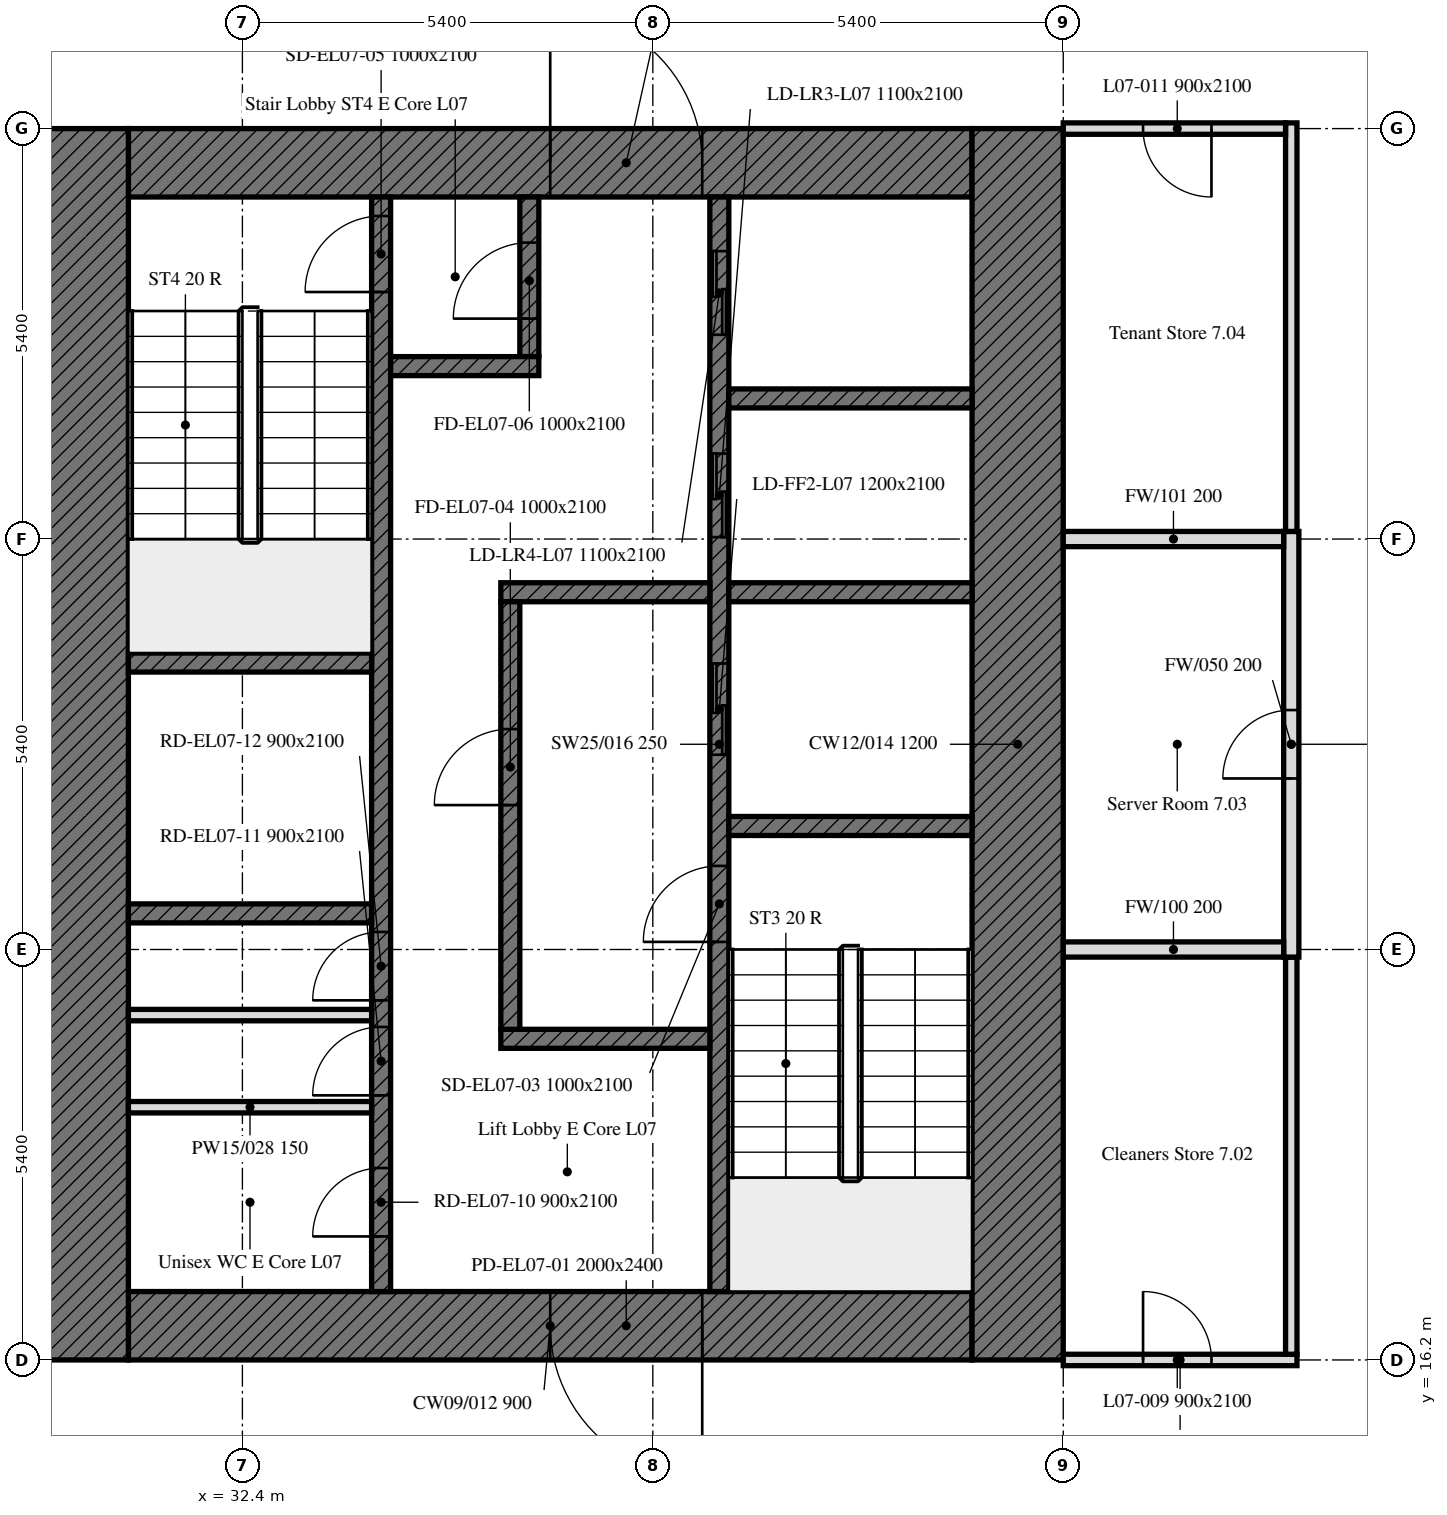
"""IFC4 building model, lengths in metres.
Left out: names, types, materials, properties, quantities, classifications, styles, units other than length and angle.
Written with IfcOpenShell. Run it as: python <this file> out.ifc"""

import sys

from ifc_helpers import new_model, si_unit, direction, frame, frame_2d, origin, place, context, subcontext, project, spatial, rectangle, extrude, element, fill, save


model = new_model("IFC4")
c1 = context("Model", 3, precision=1e-05, world=origin(), true_north=direction((0.0, 1.0)))
c2 = subcontext(c1, "Body", "Model", "MODEL_VIEW")
j1 = project(units=[si_unit("LENGTHUNIT", "METRE"), si_unit("PLANEANGLEUNIT", "RADIAN")], contexts=[c1])
p1 = place(None, origin())
s1 = spatial("IfcSite", under=j1, at=p1, CompositionType="ELEMENT")
p2 = place(p1, origin())
s2 = spatial("IfcBuilding", under=s1, at=p2, CompositionType="ELEMENT")
p3 = place(p2, frame((0.0, 0.0, 37.4)))
s3 = spatial("IfcBuildingStorey", under=s2, at=p3, CompositionType="ELEMENT", Elevation=37.4)
p4 = place(p3, frame((42.0, 16.65, 0.0), z_axis=(0.0, 0.0, 1.0), x_axis=(-1.0, 0.0, 0.0)))
e1 = element("IfcWall", 1, at=p4, inside=s3, PredefinedType="SOLIDWALL", context=c2, shape_type="SweptSolid", body=[
    extrude(rectangle(XDim=11.1, YDim=0.9, at=frame_2d((5.55, 0.0))), origin(), (0.0, 0.0, 1.0), 3.5),
])
p5 = place(p4, frame((3.55, 0.0, 0.0)))
e2 = element("IfcOpeningElement", 2, at=p5, cuts=e1, PredefinedType="OPENING", context=c2, shape_type="SweptSolid", body=[
    extrude(rectangle(XDim=2.0, YDim=2.4, at=frame_2d((1.0, 1.2))), frame((0.0, 0.45, 0.0), z_axis=(0.0, -1.0, 0.0), x_axis=(1.0, 0.0, 0.0)), (0.0, 0.0, 1.0), 0.9),
])
p6 = place(p3, frame((30.9, 31.95, 0.0), z_axis=(0.0, 0.0, 1.0), x_axis=(1.0, 0.0, 0.0)))
e3 = element("IfcWall", 3, at=p6, inside=s3, PredefinedType="SOLIDWALL", context=c2, shape_type="SweptSolid", body=[
    extrude(rectangle(XDim=11.1, YDim=0.9, at=frame_2d((5.55, 0.0))), origin(), (0.0, 0.0, 1.0), 3.5),
])
p7 = place(p6, frame((5.55, 0.0, 0.0)))
e4 = element("IfcOpeningElement", 4, at=p7, cuts=e3, PredefinedType="OPENING", context=c2, shape_type="SweptSolid", body=[
    extrude(rectangle(XDim=2.0, YDim=2.4, at=frame_2d((1.0, 1.2))), frame((0.0, 0.45, 0.0), z_axis=(0.0, -1.0, 0.0), x_axis=(1.0, 0.0, 0.0)), (0.0, 0.0, 1.0), 0.9),
])
for number, where, z_axis, x_axis in (
    (5, (42.6, 32.4, 0.0), (0.0, 0.0, 1.0), (0.0, -1.0, 0.0)),
    (6, (30.3, 16.2, 0.0), (0.0, 0.0, 1.0), (0.0, 1.0, 0.0)),
):
    element("IfcWall", number, at=place(p3, frame(where, z_axis=z_axis, x_axis=x_axis)), inside=s3, PredefinedType="SOLIDWALL", context=c2, shape_type="SweptSolid", body=[
        extrude(rectangle(XDim=16.2, YDim=1.2, at=frame_2d((8.1, 0.0))), origin(), (0.0, 0.0, 1.0), 3.5),
    ])
p8 = place(p3, frame((38.675, 17.1, 0.0), z_axis=(0.0, 0.0, 1.0), x_axis=(0.0, 1.0, 0.0)))
e7 = element("IfcWall", 7, at=p8, inside=s3, PredefinedType="SOLIDWALL", context=c2, shape_type="SweptSolid", body=[
    extrude(rectangle(XDim=14.4, YDim=0.25, at=frame_2d((7.2, 0.0))), origin(), (0.0, 0.0, 1.0), 3.5),
])
p9 = place(p8, frame((4.6, 0.0, 0.0)))
e8 = element("IfcOpeningElement", 8, at=p9, cuts=e7, PredefinedType="OPENING", context=c2, shape_type="SweptSolid", body=[
    extrude(rectangle(XDim=1.0, YDim=2.1, at=frame_2d((0.5, 1.05))), frame((0.0, 0.125, 0.0), z_axis=(0.0, -1.0, 0.0), x_axis=(1.0, 0.0, 0.0)), (0.0, 0.0, 1.0), 0.25),
])
p10 = place(p8, frame((7.062, 0.0, 0.0)))
e9 = element("IfcOpeningElement", 9, at=p10, cuts=e7, PredefinedType="OPENING", context=c2, shape_type="SweptSolid", body=[
    extrude(rectangle(XDim=1.2, YDim=2.1, at=frame_2d((0.6, 1.05))), frame((0.0, 0.125, 0.0), z_axis=(0.0, -1.0, 0.0), x_axis=(1.0, 0.0, 0.0)), (0.0, 0.0, 1.0), 0.25),
])
p11 = place(p8, frame((9.925, 0.0, 0.0)))
e10 = element("IfcOpeningElement", 10, at=p11, cuts=e7, PredefinedType="OPENING", context=c2, shape_type="SweptSolid", body=[
    extrude(rectangle(XDim=1.1, YDim=2.1, at=frame_2d((0.55, 1.05))), frame((0.0, 0.125, 0.0), z_axis=(0.0, -1.0, 0.0), x_axis=(1.0, 0.0, 0.0)), (0.0, 0.0, 1.0), 0.25),
])
p12 = place(p8, frame((12.587, 0.0, 0.0)))
e11 = element("IfcOpeningElement", 11, at=p12, cuts=e7, PredefinedType="OPENING", context=c2, shape_type="SweptSolid", body=[
    extrude(rectangle(XDim=1.1, YDim=2.1, at=frame_2d((0.55, 1.05))), frame((0.0, 0.125, 0.0), z_axis=(0.0, -1.0, 0.0), x_axis=(1.0, 0.0, 0.0)), (0.0, 0.0, 1.0), 0.25),
])
p13 = place(p3, frame((34.225, 17.1, 0.0), z_axis=(0.0, 0.0, 1.0), x_axis=(0.0, 1.0, 0.0)))
e12 = element("IfcWall", 12, at=p13, inside=s3, PredefinedType="SOLIDWALL", context=c2, shape_type="SweptSolid", body=[
    extrude(rectangle(XDim=14.4, YDim=0.25, at=frame_2d((7.2, 0.0))), origin(), (0.0, 0.0, 1.0), 3.5),
])
p14 = place(p13, frame((13.15, 0.0, 0.0)))
e13 = element("IfcOpeningElement", 13, at=p14, cuts=e12, PredefinedType="OPENING", context=c2, shape_type="SweptSolid", body=[
    extrude(rectangle(XDim=1.0, YDim=2.1, at=frame_2d((0.5, 1.05))), frame((0.0, 0.125, 0.0), z_axis=(0.0, -1.0, 0.0), x_axis=(1.0, 0.0, 0.0)), (0.0, 0.0, 1.0), 0.25),
])
p15 = place(p13, frame((0.725, 0.0, 0.0)))
e14 = element("IfcOpeningElement", 14, at=p15, cuts=e12, PredefinedType="OPENING", context=c2, shape_type="SweptSolid", body=[
    extrude(rectangle(XDim=0.9, YDim=2.1, at=frame_2d((0.45, 1.05))), frame((0.0, 0.125, 0.0), z_axis=(0.0, -1.0, 0.0), x_axis=(1.0, 0.0, 0.0)), (0.0, 0.0, 1.0), 0.25),
])
p16 = place(p13, frame((2.581, 0.0, 0.0)))
e15 = element("IfcOpeningElement", 15, at=p16, cuts=e12, PredefinedType="OPENING", context=c2, shape_type="SweptSolid", body=[
    extrude(rectangle(XDim=0.9, YDim=2.1, at=frame_2d((0.45, 1.05))), frame((0.0, 0.125, 0.0), z_axis=(0.0, -1.0, 0.0), x_axis=(1.0, 0.0, 0.0)), (0.0, 0.0, 1.0), 0.25),
])
p17 = place(p13, frame((3.831, 0.0, 0.0)))
e16 = element("IfcOpeningElement", 16, at=p17, cuts=e12, PredefinedType="OPENING", context=c2, shape_type="SweptSolid", body=[
    extrude(rectangle(XDim=0.9, YDim=2.1, at=frame_2d((0.45, 1.05))), frame((0.0, 0.125, 0.0), z_axis=(0.0, -1.0, 0.0), x_axis=(1.0, 0.0, 0.0)), (0.0, 0.0, 1.0), 0.25),
])
p18 = place(p3, frame((38.8, 23.225, 0.0), z_axis=(0.0, 0.0, 1.0), x_axis=(1.0, 0.0, 0.0)))
e17 = element("IfcWall", 17, at=p18, inside=s3, PredefinedType="SOLIDWALL", context=c2, shape_type="SweptSolid", body=[
    extrude(rectangle(XDim=3.2, YDim=0.25, at=frame_2d((1.6, 0.0))), origin(), (0.0, 0.0, 1.0), 3.5),
])
for number, where, z_axis, x_axis in (
    (18, (30.9, 25.375, 0.0), (0.0, 0.0, 1.0), (1.0, 0.0, 0.0)),
    (19, (30.9, 22.075, 0.0), (0.0, 0.0, 1.0), (1.0, 0.0, 0.0)),
):
    element("IfcWall", number, at=place(p3, frame(where, z_axis=z_axis, x_axis=x_axis)), inside=s3, PredefinedType="SOLIDWALL", context=c2, shape_type="SweptSolid", body=[
        extrude(rectangle(XDim=3.2, YDim=0.25, at=frame_2d((1.6, 0.0))), origin(), (0.0, 0.0, 1.0), 3.5),
    ])
p19 = place(p3, frame((38.8, 26.3, 0.0), z_axis=(0.0, 0.0, 1.0), x_axis=(1.0, 0.0, 0.0)))
e20 = element("IfcWall", 20, at=p19, inside=s3, PredefinedType="SOLIDWALL", context=c2, shape_type="SweptSolid", body=[
    extrude(rectangle(XDim=3.2, YDim=0.25, at=frame_2d((1.6, 0.0))), origin(), (0.0, 0.0, 1.0), 3.5),
])
for number, where, z_axis, x_axis in (
    (21, (35.8, 26.3, 0.0), (0.0, 0.0, 1.0), (1.0, 0.0, 0.0)),
    (22, (35.8, 20.425, 0.0), (0.0, 0.0, 1.0), (1.0, 0.0, 0.0)),
):
    element("IfcWall", number, at=place(p3, frame(where, z_axis=z_axis, x_axis=x_axis)), inside=s3, PredefinedType="SOLIDWALL", context=c2, shape_type="SweptSolid", body=[
        extrude(rectangle(XDim=2.75, YDim=0.25, at=frame_2d((1.375, 0.0))), origin(), (0.0, 0.0, 1.0), 3.5),
    ])
p20 = place(p3, frame((36.175, 29.4, 0.0), z_axis=(0.0, 0.0, 1.0), x_axis=(0.0, 1.0, 0.0)))
e23 = element("IfcWall", 23, at=p20, inside=s3, PredefinedType="SOLIDWALL", context=c2, shape_type="SweptSolid", body=[
    extrude(rectangle(XDim=2.1, YDim=0.25, at=frame_2d((1.05, 0.0))), origin(), (0.0, 0.0, 1.0), 3.5),
])
p21 = place(p20, frame((0.5, 0.0, 0.0)))
e24 = element("IfcOpeningElement", 24, at=p21, cuts=e23, PredefinedType="OPENING", context=c2, shape_type="SweptSolid", body=[
    extrude(rectangle(XDim=1.0, YDim=2.1, at=frame_2d((0.5, 1.05))), frame((0.0, 0.125, 0.0), z_axis=(0.0, -1.0, 0.0), x_axis=(1.0, 0.0, 0.0)), (0.0, 0.0, 1.0), 0.25),
])
p22 = place(p3, frame((34.35, 29.275, 0.0), z_axis=(0.0, 0.0, 1.0), x_axis=(1.0, 0.0, 0.0)))
e25 = element("IfcWall", 25, at=p22, inside=s3, PredefinedType="SOLIDWALL", context=c2, shape_type="SweptSolid", body=[
    extrude(rectangle(XDim=1.95, YDim=0.25, at=frame_2d((0.975, 0.0))), origin(), (0.0, 0.0, 1.0), 3.5),
])
p23 = place(p3, frame((35.925, 20.55, 0.0), z_axis=(0.0, 0.0, 1.0), x_axis=(0.0, 1.0, 0.0)))
e26 = element("IfcWall", 26, at=p23, inside=s3, PredefinedType="SOLIDWALL", context=c2, shape_type="SweptSolid", body=[
    extrude(rectangle(XDim=5.625, YDim=0.25, at=frame_2d((2.812, 0.0))), origin(), (0.0, 0.0, 1.0), 3.5),
])
p24 = place(p23, frame((2.95, 0.0, 0.0)))
e27 = element("IfcOpeningElement", 27, at=p24, cuts=e26, PredefinedType="OPENING", context=c2, shape_type="SweptSolid", body=[
    extrude(rectangle(XDim=1.0, YDim=2.1, at=frame_2d((0.5, 1.05))), frame((0.0, 0.125, 0.0), z_axis=(0.0, -1.0, 0.0), x_axis=(1.0, 0.0, 0.0)), (0.0, 0.0, 1.0), 0.25),
])
p25 = place(p3, frame((38.8, 28.85, 0.0), z_axis=(0.0, 0.0, 1.0), x_axis=(1.0, 0.0, 0.0)))
e28 = element("IfcWall", 28, at=p25, inside=s3, PredefinedType="SOLIDWALL", context=c2, shape_type="SweptSolid", body=[
    extrude(rectangle(XDim=3.2, YDim=0.25, at=frame_2d((1.6, 0.0))), origin(), (0.0, 0.0, 1.0), 3.5),
])
for number, where, z_axis, x_axis in (
    (29, (30.9, 19.525, 0.0), (0.0, 0.0, 1.0), (1.0, 0.0, 0.0)),
    (30, (30.9, 20.737, 0.0), (0.0, 0.0, 1.0), (1.0, 0.0, 0.0)),
):
    element("IfcWall", number, at=place(p3, frame(where, z_axis=z_axis, x_axis=x_axis)), inside=s3, PredefinedType="PARTITIONING", context=c2, shape_type="SweptSolid", body=[
        extrude(rectangle(XDim=3.2, YDim=0.15, at=frame_2d((1.6, 0.0))), origin(), (0.0, 0.0, 1.0), 3.5),
    ])
p26 = place(p3, frame((43.2, 16.2, 0.0), z_axis=(0.0, 0.0, 1.0), x_axis=(1.0, 0.0, 0.0)))
e31 = element("IfcWall", 31, at=p26, inside=s3, PredefinedType="PARTITIONING", context=c2, shape_type="SweptSolid", body=[
    extrude(rectangle(XDim=3.075, YDim=0.15, at=frame_2d((1.538, 0.0))), origin(), (0.0, 0.0, 1.0), 2.75),
])
p27 = place(p26, frame((1.05, 0.0, 0.0)))
e32 = element("IfcOpeningElement", 32, at=p27, cuts=e31, PredefinedType="OPENING", context=c2, shape_type="SweptSolid", body=[
    extrude(rectangle(XDim=0.9, YDim=2.1, at=frame_2d((0.45, 1.05))), frame((0.0, 0.075, 0.0), z_axis=(0.0, -1.0, 0.0), x_axis=(1.0, 0.0, 0.0)), (0.0, 0.0, 1.0), 0.15),
])
p28 = place(p3, frame((46.2, 16.275, 0.0), z_axis=(0.0, 0.0, 1.0), x_axis=(0.0, 1.0, 0.0)))
e33 = element("IfcWall", 33, at=p28, inside=s3, PredefinedType="PARTITIONING", context=c2, shape_type="SweptSolid", body=[
    extrude(rectangle(XDim=5.225, YDim=0.15, at=frame_2d((2.613, 0.0))), origin(), (0.0, 0.0, 1.0), 3.5),
])
p29 = place(p3, frame((46.2, 21.5, 0.0), z_axis=(0.0, 0.0, 1.0), x_axis=(0.0, 1.0, 0.0)))
e34 = element("IfcWall", 34, at=p29, inside=s3, PredefinedType="PARTITIONING", context=c2, shape_type="SweptSolid", body=[
    extrude(rectangle(XDim=5.6, YDim=0.2, at=frame_2d((2.8, 0.0))), origin(), (0.0, 0.0, 1.0), 3.5),
])
p30 = place(p29, frame((2.35, 0.0, 0.0)))
e35 = element("IfcOpeningElement", 35, at=p30, cuts=e34, PredefinedType="OPENING", context=c2, shape_type="SweptSolid", body=[
    extrude(rectangle(XDim=0.9, YDim=2.1, at=frame_2d((0.45, 1.05))), frame((0.0, 0.1, 0.0), z_axis=(0.0, -1.0, 0.0), x_axis=(1.0, 0.0, 0.0)), (0.0, 0.0, 1.0), 0.2),
])
p31 = place(p3, frame((46.2, 27.1, 0.0), z_axis=(0.0, 0.0, 1.0), x_axis=(0.0, 1.0, 0.0)))
e36 = element("IfcWall", 36, at=p31, inside=s3, PredefinedType="PARTITIONING", context=c2, shape_type="SweptSolid", body=[
    extrude(rectangle(XDim=5.375, YDim=0.15, at=frame_2d((2.688, 0.0))), origin(), (0.0, 0.0, 1.0), 3.5),
])
p32 = place(p3, frame((46.125, 32.4, 0.0), z_axis=(0.0, 0.0, 1.0), x_axis=(-1.0, 0.0, 0.0)))
e37 = element("IfcWall", 37, at=p32, inside=s3, PredefinedType="PARTITIONING", context=c2, shape_type="SweptSolid", body=[
    extrude(rectangle(XDim=2.925, YDim=0.15, at=frame_2d((1.462, 0.0))), origin(), (0.0, 0.0, 1.0), 2.75),
])
p33 = place(p32, frame((0.975, 0.0, 0.0)))
e38 = element("IfcOpeningElement", 38, at=p33, cuts=e37, PredefinedType="OPENING", context=c2, shape_type="SweptSolid", body=[
    extrude(rectangle(XDim=0.9, YDim=2.1, at=frame_2d((0.45, 1.05))), frame((0.0, 0.075, 0.0), z_axis=(0.0, -1.0, 0.0), x_axis=(1.0, 0.0, 0.0)), (0.0, 0.0, 1.0), 0.15),
])
for number, where, z_axis, x_axis in (
    (39, (46.1, 21.6, 0.0), (0.0, 0.0, 1.0), (-1.0, 0.0, 0.0)),
    (40, (46.1, 27.0, 0.0), (0.0, 0.0, 1.0), (-1.0, 0.0, 0.0)),
):
    element("IfcWall", number, at=place(p3, frame(where, z_axis=z_axis, x_axis=x_axis)), inside=s3, PredefinedType="PARTITIONING", context=c2, shape_type="SweptSolid", body=[
        extrude(rectangle(XDim=2.9, YDim=0.2, at=frame_2d((1.45, 0.0))), origin(), (0.0, 0.0, 1.0), 2.75),
    ])
p34 = place(p5, origin())
e41 = element("IfcDoor", 41, at=p34, inside=s3, OperationType="DOUBLE_DOOR_SINGLE_SWING", PredefinedType="DOOR", context=c2, shape_type="SweptSolid", body=[
    extrude(rectangle(XDim=2.0, YDim=2.4, at=frame_2d((1.0, 1.2))), frame((0.0, 0.025, 0.0), z_axis=(0.0, -1.0, 0.0), x_axis=(1.0, 0.0, 0.0)), (0.0, 0.0, 1.0), 0.05),
])
fill(e2, e41)
p35 = place(p7, origin())
e42 = element("IfcDoor", 42, at=p35, inside=s3, OperationType="DOUBLE_DOOR_SINGLE_SWING", PredefinedType="DOOR", context=c2, shape_type="SweptSolid", body=[
    extrude(rectangle(XDim=2.0, YDim=2.4, at=frame_2d((1.0, 1.2))), frame((0.0, 0.025, 0.0), z_axis=(0.0, -1.0, 0.0), x_axis=(1.0, 0.0, 0.0)), (0.0, 0.0, 1.0), 0.05),
])
fill(e4, e42)
p36 = place(p9, origin())
e43 = element("IfcDoor", 43, at=p36, inside=s3, OperationType="SINGLE_SWING_LEFT", PredefinedType="DOOR", context=c2, shape_type="SweptSolid", body=[
    extrude(rectangle(XDim=1.0, YDim=2.1, at=frame_2d((0.5, 1.05))), frame((0.0, 0.025, 0.0), z_axis=(0.0, -1.0, 0.0), x_axis=(1.0, 0.0, 0.0)), (0.0, 0.0, 1.0), 0.05),
])
fill(e8, e43)
p37 = place(p24, origin())
e44 = element("IfcDoor", 44, at=p37, inside=s3, OperationType="SINGLE_SWING_LEFT", PredefinedType="DOOR", context=c2, shape_type="SweptSolid", body=[
    extrude(rectangle(XDim=1.0, YDim=2.1, at=frame_2d((0.5, 1.05))), frame((0.0, 0.025, 0.0), z_axis=(0.0, -1.0, 0.0), x_axis=(1.0, 0.0, 0.0)), (0.0, 0.0, 1.0), 0.05),
])
fill(e27, e44)
p38 = place(p14, origin())
e45 = element("IfcDoor", 45, at=p38, inside=s3, OperationType="SINGLE_SWING_LEFT", PredefinedType="DOOR", context=c2, shape_type="SweptSolid", body=[
    extrude(rectangle(XDim=1.0, YDim=2.1, at=frame_2d((0.5, 1.05))), frame((0.0, 0.025, 0.0), z_axis=(0.0, -1.0, 0.0), x_axis=(1.0, 0.0, 0.0)), (0.0, 0.0, 1.0), 0.05),
])
fill(e13, e45)
p39 = place(p21, origin())
e46 = element("IfcDoor", 46, at=p39, inside=s3, OperationType="SINGLE_SWING_LEFT", PredefinedType="DOOR", context=c2, shape_type="SweptSolid", body=[
    extrude(rectangle(XDim=1.0, YDim=2.1, at=frame_2d((0.5, 1.05))), frame((0.0, 0.025, 0.0), z_axis=(0.0, -1.0, 0.0), x_axis=(1.0, 0.0, 0.0)), (0.0, 0.0, 1.0), 0.05),
])
fill(e24, e46)
p40 = place(p10, origin())
e47 = element("IfcDoor", 47, at=p40, inside=s3, OperationType="DOUBLE_DOOR_SLIDING", PredefinedType="DOOR", context=c2, shape_type="SweptSolid", body=[
    extrude(rectangle(XDim=1.2, YDim=2.1, at=frame_2d((0.6, 1.05))), frame((0.0, 0.025, 0.0), z_axis=(0.0, -1.0, 0.0), x_axis=(1.0, 0.0, 0.0)), (0.0, 0.0, 1.0), 0.05),
])
fill(e9, e47)
p41 = place(p11, origin())
e48 = element("IfcDoor", 48, at=p41, inside=s3, OperationType="DOUBLE_DOOR_SLIDING", PredefinedType="DOOR", context=c2, shape_type="SweptSolid", body=[
    extrude(rectangle(XDim=1.1, YDim=2.1, at=frame_2d((0.55, 1.05))), frame((0.0, 0.025, 0.0), z_axis=(0.0, -1.0, 0.0), x_axis=(1.0, 0.0, 0.0)), (0.0, 0.0, 1.0), 0.05),
])
fill(e10, e48)
p42 = place(p12, origin())
e49 = element("IfcDoor", 49, at=p42, inside=s3, OperationType="DOUBLE_DOOR_SLIDING", PredefinedType="DOOR", context=c2, shape_type="SweptSolid", body=[
    extrude(rectangle(XDim=1.1, YDim=2.1, at=frame_2d((0.55, 1.05))), frame((0.0, 0.025, 0.0), z_axis=(0.0, -1.0, 0.0), x_axis=(1.0, 0.0, 0.0)), (0.0, 0.0, 1.0), 0.05),
])
fill(e11, e49)
p43 = place(p15, origin())
e50 = element("IfcDoor", 50, at=p43, inside=s3, OperationType="SINGLE_SWING_LEFT", PredefinedType="DOOR", context=c2, shape_type="SweptSolid", body=[
    extrude(rectangle(XDim=0.9, YDim=2.1, at=frame_2d((0.45, 1.05))), frame((0.0, 0.025, 0.0), z_axis=(0.0, -1.0, 0.0), x_axis=(1.0, 0.0, 0.0)), (0.0, 0.0, 1.0), 0.05),
])
fill(e14, e50)
p44 = place(p16, origin())
e51 = element("IfcDoor", 51, at=p44, inside=s3, OperationType="SINGLE_SWING_LEFT", PredefinedType="DOOR", context=c2, shape_type="SweptSolid", body=[
    extrude(rectangle(XDim=0.9, YDim=2.1, at=frame_2d((0.45, 1.05))), frame((0.0, 0.025, 0.0), z_axis=(0.0, -1.0, 0.0), x_axis=(1.0, 0.0, 0.0)), (0.0, 0.0, 1.0), 0.05),
])
fill(e15, e51)
p45 = place(p17, origin())
e52 = element("IfcDoor", 52, at=p45, inside=s3, OperationType="SINGLE_SWING_LEFT", PredefinedType="DOOR", context=c2, shape_type="SweptSolid", body=[
    extrude(rectangle(XDim=0.9, YDim=2.1, at=frame_2d((0.45, 1.05))), frame((0.0, 0.025, 0.0), z_axis=(0.0, -1.0, 0.0), x_axis=(1.0, 0.0, 0.0)), (0.0, 0.0, 1.0), 0.05),
])
fill(e16, e52)
p46 = place(p27, origin())
e53 = element("IfcDoor", 53, at=p46, inside=s3, OperationType="SINGLE_SWING_LEFT", PredefinedType="DOOR", context=c2, shape_type="SweptSolid", body=[
    extrude(rectangle(XDim=0.9, YDim=2.1, at=frame_2d((0.45, 1.05))), frame((0.0, 0.025, 0.0), z_axis=(0.0, -1.0, 0.0), x_axis=(1.0, 0.0, 0.0)), (0.0, 0.0, 1.0), 0.05),
])
fill(e32, e53)
p47 = place(p30, origin())
e54 = element("IfcDoor", 54, at=p47, inside=s3, OperationType="SINGLE_SWING_LEFT", PredefinedType="DOOR", context=c2, shape_type="SweptSolid", body=[
    extrude(rectangle(XDim=0.9, YDim=2.1, at=frame_2d((0.45, 1.05))), frame((0.0, 0.025, 0.0), z_axis=(0.0, -1.0, 0.0), x_axis=(1.0, 0.0, 0.0)), (0.0, 0.0, 1.0), 0.05),
])
fill(e35, e54)
p48 = place(p33, origin())
e55 = element("IfcDoor", 55, at=p48, inside=s3, OperationType="SINGLE_SWING_LEFT", PredefinedType="DOOR", context=c2, shape_type="SweptSolid", body=[
    extrude(rectangle(XDim=0.9, YDim=2.1, at=frame_2d((0.45, 1.05))), frame((0.0, 0.025, 0.0), z_axis=(0.0, -1.0, 0.0), x_axis=(1.0, 0.0, 0.0)), (0.0, 0.0, 1.0), 0.05),
])
fill(e38, e55)
save(model, sys.argv[1])
